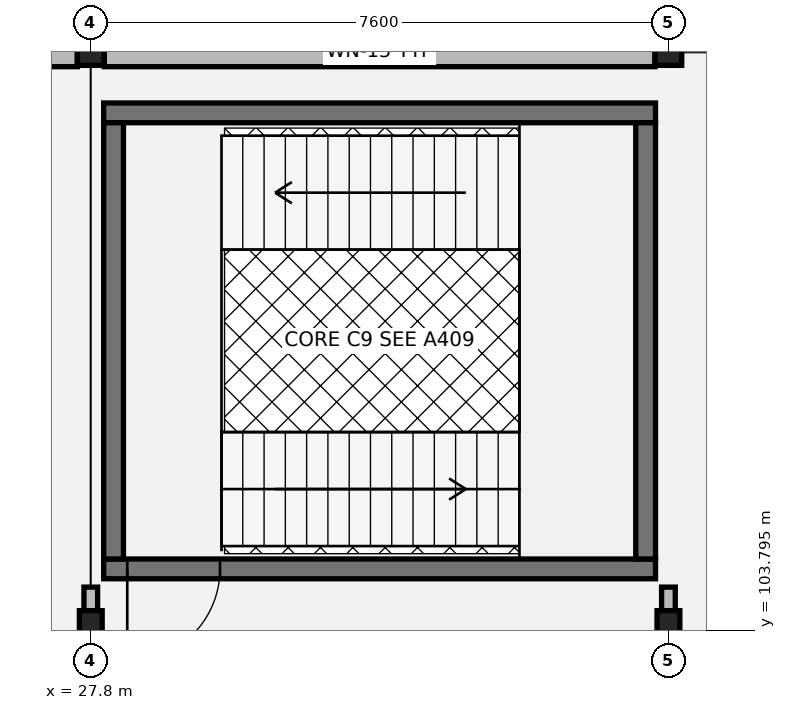
"""IFC4 building model, lengths in metres.
Left out: names, types, materials, properties, quantities, classifications, styles, units other than length and angle.
Written with IfcOpenShell. Run it as: python <this file> out.ifc"""

import sys

from ifc_helpers import new_model, si_unit, direction, frame, frame_2d, origin, origin_2d, place, context, subcontext, project, spatial, rectangle, hollow_rectangle, i_section, extrude, element, fill, save


model = new_model("IFC4")
c1 = context("Model", 3, precision=1e-05, world=origin(), true_north=direction((0.0, 1.0)))
c2 = subcontext(c1, "Body", "Model", "MODEL_VIEW")
j1 = project(units=[si_unit("LENGTHUNIT", "METRE"), si_unit("PLANEANGLEUNIT", "RADIAN")], contexts=[c1])
p1 = place(None, origin())
s1 = spatial("IfcSite", under=j1, at=p1, CompositionType="ELEMENT")
p2 = place(p1, origin())
s2 = spatial("IfcBuilding", under=s1, at=p2, CompositionType="ELEMENT")
p3 = place(p2, origin())
s3 = spatial("IfcBuildingStorey", under=s2, at=p3, CompositionType="ELEMENT", Elevation=0.0)
p4 = place(p3, frame((27.8, 103.8, 0.0), z_axis=(0.0, 0.0, 1.0), x_axis=(1.0, 0.0, 0.0)))
e1 = element("IfcColumn", 1, at=p4, inside=s3, PredefinedType="COLUMN", context=c2, shape_type="SweptSolid", body=[
    extrude(i_section(OverallWidth=0.3, OverallDepth=0.5, WebThickness=0.014, FlangeThickness=0.028, at=origin_2d()), origin(), (0.0, 0.0, 1.0), 5.075),
])
p5 = place(p3, frame((27.8, 111.4, 0.0), z_axis=(0.0, 0.0, 1.0), x_axis=(1.0, 0.0, 0.0)))
e2 = element("IfcColumn", 2, at=p5, inside=s3, PredefinedType="COLUMN", context=c2, shape_type="SweptSolid", body=[
    extrude(hollow_rectangle(XDim=0.35, YDim=0.35, WallThickness=0.014, at=origin_2d()), origin(), (0.0, 0.0, 1.0), 5.075),
])
p6 = place(p3, frame((35.4, 103.8, 0.0), z_axis=(0.0, 0.0, 1.0), x_axis=(1.0, 0.0, 0.0)))
e3 = element("IfcColumn", 3, at=p6, inside=s3, PredefinedType="COLUMN", context=c2, shape_type="SweptSolid", body=[
    extrude(i_section(OverallWidth=0.3, OverallDepth=0.5, WebThickness=0.014, FlangeThickness=0.028, at=origin_2d()), origin(), (0.0, 0.0, 1.0), 5.075),
])
p7 = place(p3, frame((35.4, 111.4, 0.0), z_axis=(0.0, 0.0, 1.0), x_axis=(1.0, 0.0, 0.0)))
e4 = element("IfcColumn", 4, at=p7, inside=s3, PredefinedType="COLUMN", context=c2, shape_type="SweptSolid", body=[
    extrude(hollow_rectangle(XDim=0.35, YDim=0.35, WallThickness=0.014, at=origin_2d()), origin(), (0.0, 0.0, 1.0), 5.075),
])
p8 = place(p3, frame((35.222, 111.4, 0.0), z_axis=(0.0, 0.0, 1.0), x_axis=(-1.0, 0.0, 0.0)))
e5 = element("IfcWall", 5, at=p8, inside=s3, PredefinedType="SOLIDWALL", context=c2, shape_type="SweptSolid", body=[
    extrude(rectangle(XDim=7.244, YDim=0.385, at=frame_2d((3.622, 0.0))), origin(), (0.0, 0.0, 1.0), 4.5),
])
p9 = place(p8, frame((2.972, 0.0, 0.8)))
e6 = element("IfcOpeningElement", 6, at=p9, cuts=e5, PredefinedType="OPENING", context=c2, shape_type="SweptSolid", body=[
    extrude(rectangle(XDim=1.3, YDim=2.12, at=frame_2d((0.65, 1.06))), frame((0.0, 0.202, 0.0), z_axis=(0.0, -1.0, 0.0), x_axis=(1.0, 0.0, 0.0)), (0.0, 0.0, 1.0), 0.405),
])
p10 = place(p3, frame((27.622, 111.4, 0.0), z_axis=(0.0, 0.0, 1.0), x_axis=(-1.0, 0.0, 0.0)))
e7 = element("IfcWall", 7, at=p10, inside=s3, PredefinedType="SOLIDWALL", context=c2, shape_type="SweptSolid", body=[
    extrude(rectangle(XDim=7.244, YDim=0.385, at=frame_2d((3.622, 0.0))), origin(), (0.0, 0.0, 1.0), 4.5),
])
p11 = place(p10, frame((3.072, 0.0, 0.8)))
e8 = element("IfcOpeningElement", 8, at=p11, cuts=e7, PredefinedType="OPENING", context=c2, shape_type="SweptSolid", body=[
    extrude(rectangle(XDim=1.1, YDim=2.05, at=frame_2d((0.55, 1.025))), frame((0.0, 0.202, 0.0), z_axis=(0.0, -1.0, 0.0), x_axis=(1.0, 0.0, 0.0)), (0.0, 0.0, 1.0), 0.405),
])
p12 = place(p3, frame((27.97, 104.6, 0.0), z_axis=(0.0, 0.0, 1.0), x_axis=(1.0, 0.0, 0.0)))
e9 = element("IfcWall", 9, at=p12, inside=s3, PredefinedType="SHEAR", context=c2, shape_type="SweptSolid", body=[
    extrude(rectangle(XDim=7.26, YDim=0.26, at=frame_2d((3.63, 0.0))), origin(), (0.0, 0.0, 1.0), 4.865),
])
p13 = place(p12, frame((0.31, 0.0, 0.0)))
e10 = element("IfcOpeningElement", 10, at=p13, cuts=e9, PredefinedType="OPENING", context=c2, shape_type="SweptSolid", body=[
    extrude(rectangle(XDim=1.22, YDim=2.18, at=frame_2d((0.61, 1.09))), frame((0.0, 0.14, 0.0), z_axis=(0.0, -1.0, 0.0), x_axis=(1.0, 0.0, 0.0)), (0.0, 0.0, 1.0), 0.28),
])
p14 = place(p3, frame((27.97, 110.6, 0.0), z_axis=(0.0, 0.0, 1.0), x_axis=(1.0, 0.0, 0.0)))
e11 = element("IfcWall", 11, at=p14, inside=s3, PredefinedType="SHEAR", context=c2, shape_type="SweptSolid", body=[
    extrude(rectangle(XDim=7.26, YDim=0.26, at=frame_2d((3.63, 0.0))), origin(), (0.0, 0.0, 1.0), 4.865),
])
for number, where, z_axis, x_axis in (
    (12, (28.1, 104.73, 0.0), (0.0, 0.0, 1.0), (0.0, 1.0, 0.0)),
    (13, (35.1, 104.73, 0.0), (0.0, 0.0, 1.0), (0.0, 1.0, 0.0)),
):
    element("IfcWall", number, at=place(p3, frame(where, z_axis=z_axis, x_axis=x_axis)), inside=s3, PredefinedType="SHEAR", context=c2, shape_type="SweptSolid", body=[
        extrude(rectangle(XDim=5.74, YDim=0.26, at=frame_2d((2.87, 0.0))), origin(), (0.0, 0.0, 1.0), 4.865),
    ])
for number, where, z_axis, x_axis in (
    (14, (27.8, 104.04, 0.0), (0.0, 0.0, 1.0), (0.0, 1.0, 0.0)),
    (15, (35.4, 104.04, 0.0), (0.0, 0.0, 1.0), (0.0, 1.0, 0.0)),
):
    element("IfcWall", number, at=place(p3, frame(where, z_axis=z_axis, x_axis=x_axis)), inside=s3, PredefinedType="PARTITIONING", context=c2, shape_type="SweptSolid", body=[
        extrude(rectangle(XDim=0.32, YDim=0.18, at=frame_2d((0.16, 0.0))), origin(), (0.0, 0.0, 1.0), 4.2),
    ])
p15 = place(p9, origin())
e16 = element("IfcWindow", 16, at=p15, inside=s3, PartitioningType="SINGLE_PANEL", PredefinedType="WINDOW", context=c2, shape_type="SweptSolid", body=[
    extrude(rectangle(XDim=1.3, YDim=2.12, at=frame_2d((0.65, 1.06))), frame((0.0, 0.03, 0.0), z_axis=(0.0, -1.0, 0.0), x_axis=(1.0, 0.0, 0.0)), (0.0, 0.0, 1.0), 0.06),
])
fill(e6, e16)
p16 = place(p13, origin())
e17 = element("IfcDoor", 17, at=p16, inside=s3, OperationType="SINGLE_SWING_RIGHT", PredefinedType="DOOR", context=c2, shape_type="SweptSolid", body=[
    extrude(rectangle(XDim=1.22, YDim=2.18, at=frame_2d((0.61, 1.09))), frame((0.0, 0.025, 0.0), z_axis=(0.0, -1.0, 0.0), x_axis=(1.0, 0.0, 0.0)), (0.0, 0.0, 1.0), 0.05),
])
fill(e10, e17)
save(model, sys.argv[1])
